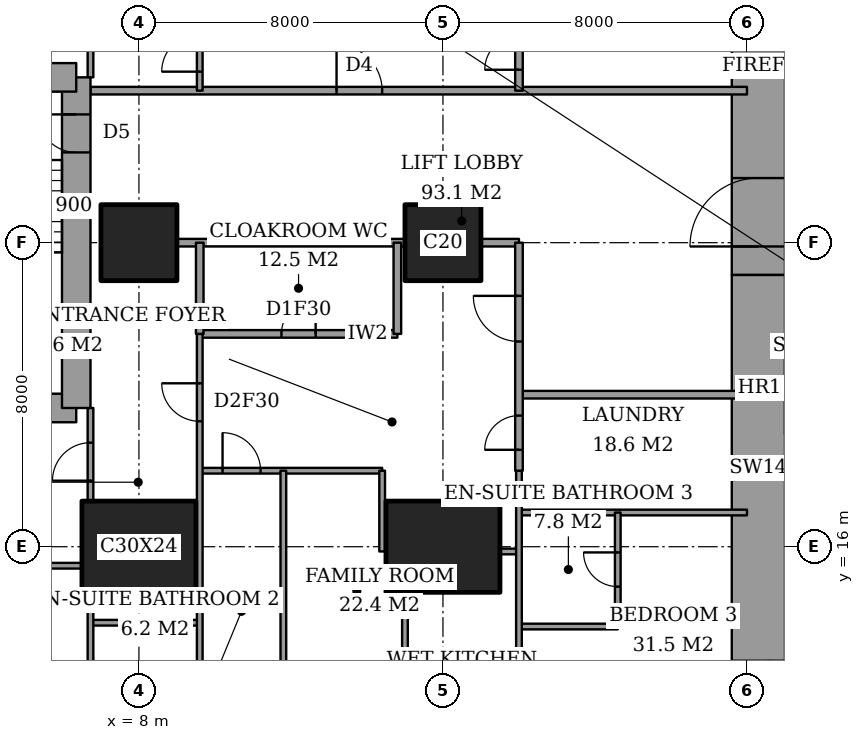
"""IFC4 building model, lengths in metres.
Left out: names, types, materials, properties, quantities, classifications, styles, units other than length and angle.
Written with IfcOpenShell. Run it as: python <this file> out.ifc"""

import sys

from ifc_helpers import new_model, si_unit, direction, frame, frame_2d, origin, origin_2d, place, context, subcontext, project, spatial, rectangle, extrude, element, fill, save


model = new_model("IFC4")
c1 = context("Model", 3, precision=1e-05, world=origin(), true_north=direction((0.0, 1.0)))
c2 = subcontext(c1, "Body", "Model", "MODEL_VIEW")
j1 = project(units=[si_unit("LENGTHUNIT", "METRE"), si_unit("PLANEANGLEUNIT", "RADIAN")], contexts=[c1])
p1 = place(None, origin())
s1 = spatial("IfcSite", under=j1, at=p1, CompositionType="ELEMENT")
p2 = place(p1, origin())
s2 = spatial("IfcBuilding", under=s1, at=p2, CompositionType="ELEMENT")
p3 = place(p2, frame((0.0, 0.0, 62.0)))
s3 = spatial("IfcBuildingStorey", under=s2, at=p3, CompositionType="ELEMENT", Elevation=62.0)
p4 = place(p3, frame((8.0, 16.0, 0.0), z_axis=(0.0, 0.0, 1.0), x_axis=(1.0, 0.0, 0.0)))
e1 = element("IfcColumn", 1, at=p4, inside=s3, PredefinedType="COLUMN", context=c2, shape_type="SweptSolid", body=[
    extrude(rectangle(XDim=3.0, YDim=2.4, at=origin_2d()), origin(), (0.0, 0.0, 1.0), 3.6),
])
p5 = place(p3, frame((8.0, 24.0, 0.0), z_axis=(0.0, 0.0, 1.0), x_axis=(1.0, 0.0, 0.0)))
e2 = element("IfcColumn", 2, at=p5, inside=s3, PredefinedType="COLUMN", context=c2, shape_type="SweptSolid", body=[
    extrude(rectangle(XDim=2.0, YDim=2.0, at=origin_2d()), origin(), (0.0, 0.0, 1.0), 3.6),
])
p6 = place(p3, frame((16.0, 16.0, 0.0), z_axis=(0.0, 0.0, 1.0), x_axis=(1.0, 0.0, 0.0)))
e3 = element("IfcColumn", 3, at=p6, inside=s3, PredefinedType="COLUMN", context=c2, shape_type="SweptSolid", body=[
    extrude(rectangle(XDim=3.0, YDim=2.4, at=origin_2d()), origin(), (0.0, 0.0, 1.0), 3.6),
])
p7 = place(p3, frame((16.0, 24.0, 0.0), z_axis=(0.0, 0.0, 1.0), x_axis=(1.0, 0.0, 0.0)))
e4 = element("IfcColumn", 4, at=p7, inside=s3, PredefinedType="COLUMN", context=c2, shape_type="SweptSolid", body=[
    extrude(rectangle(XDim=2.0, YDim=2.0, at=origin_2d()), origin(), (0.0, 0.0, 1.0), 3.6),
])
p8 = place(p3, frame((24.3, 13.0, 0.0), z_axis=(0.0, 0.0, 1.0), x_axis=(0.0, 1.0, 0.0)))
e5 = element("IfcWall", 5, at=p8, inside=s3, PredefinedType="SHEAR", context=c2, shape_type="SweptSolid", body=[
    extrude(rectangle(XDim=10.15, YDim=1.4, at=frame_2d((5.075, 0.0))), origin(), (0.0, 0.0, 1.0), 3.6),
])
p9 = place(p3, frame((24.3, 23.15, 0.0), z_axis=(0.0, 0.0, 1.0), x_axis=(0.0, 1.0, 0.0)))
e6 = element("IfcWall", 6, at=p9, inside=s3, PredefinedType="SHEAR", context=c2, shape_type="SweptSolid", body=[
    extrude(rectangle(XDim=11.85, YDim=1.4, at=frame_2d((5.925, 0.0))), origin(), (0.0, 0.0, 1.0), 3.6),
])
p10 = place(p9, frame((0.75, 0.0, 0.0)))
e7 = element("IfcOpeningElement", 7, at=p10, cuts=e6, PredefinedType="OPENING", context=c2, shape_type="SweptSolid", body=[
    extrude(rectangle(XDim=1.8, YDim=2.4, at=frame_2d((0.9, 1.2))), frame((0.0, 0.71, 0.0), z_axis=(0.0, -1.0, 0.0), x_axis=(1.0, 0.0, 0.0)), (0.0, 0.0, 1.0), 1.42),
])
p11 = place(p3, frame((1.9, 19.65, 0.0), z_axis=(0.0, 0.0, 1.0), x_axis=(1.0, 0.0, 0.0)))
e8 = element("IfcWall", 8, at=p11, inside=s3, PredefinedType="SHEAR", context=c2, shape_type="SweptSolid", body=[
    extrude(rectangle(XDim=4.45, YDim=0.75, at=frame_2d((2.225, 0.0))), origin(), (0.0, 0.0, 1.0), 3.6),
])
p12 = place(p3, frame((6.35, 19.65, 0.0), z_axis=(0.0, 0.0, 1.0), x_axis=(0.0, 1.0, 0.0)))
e9 = element("IfcWall", 9, at=p12, inside=s3, PredefinedType="SHEAR", context=c2, shape_type="SweptSolid", body=[
    extrude(rectangle(XDim=8.7, YDim=0.75, at=frame_2d((4.35, 0.0))), origin(), (0.0, 0.0, 1.0), 3.6),
])
p13 = place(p12, frame((6.725, 0.0, 0.0)))
e10 = element("IfcOpeningElement", 10, at=p13, cuts=e9, PredefinedType="OPENING", context=c2, shape_type="SweptSolid", body=[
    extrude(rectangle(XDim=1.0, YDim=2.1, at=frame_2d((0.5, 1.05))), frame((0.0, 0.385, 0.0), z_axis=(0.0, -1.0, 0.0), x_axis=(1.0, 0.0, 0.0)), (0.0, 0.0, 1.0), 0.77),
])
p14 = place(p3, frame((6.35, 28.35, 0.0), z_axis=(0.0, 0.0, 1.0), x_axis=(-1.0, 0.0, 0.0)))
e11 = element("IfcWall", 11, at=p14, inside=s3, PredefinedType="SHEAR", context=c2, shape_type="SweptSolid", body=[
    extrude(rectangle(XDim=4.45, YDim=0.75, at=frame_2d((2.225, 0.0))), origin(), (0.0, 0.0, 1.0), 3.6),
])
p15 = place(p3, frame((18.0, 13.9, 0.0), z_axis=(0.0, 0.0, 1.0), x_axis=(1.0, 0.0, 0.0)))
e12 = element("IfcWall", 12, at=p15, inside=s3, PredefinedType="PARTITIONING", context=c2, shape_type="SweptSolid", body=[
    extrude(rectangle(XDim=2.6, YDim=0.15, at=frame_2d((1.3, 0.0))), origin(), (0.0, 0.0, 1.0), 3.35),
])
p16 = place(p3, frame((6.725, 14.0, 0.0), z_axis=(0.0, 0.0, 1.0), x_axis=(1.0, 0.0, 0.0)))
e13 = element("IfcWall", 13, at=p16, inside=s3, PredefinedType="PARTITIONING", context=c2, shape_type="SweptSolid", body=[
    extrude(rectangle(XDim=2.875, YDim=0.15, at=frame_2d((1.438, 0.0))), origin(), (0.0, 0.0, 1.0), 3.35),
])
p17 = place(p3, frame((1.35, 15.5, 0.0), z_axis=(0.0, 0.0, 1.0), x_axis=(1.0, 0.0, 0.0)))
e14 = element("IfcWall", 14, at=p17, inside=s3, PredefinedType="PARTITIONING", context=c2, shape_type="SweptSolid", body=[
    extrude(rectangle(XDim=5.15, YDim=0.15, at=frame_2d((2.575, 0.0))), origin(), (0.0, 0.0, 1.0), 3.35),
])
p18 = place(p3, frame((17.5, 15.875, 0.0), z_axis=(0.0, 0.0, 1.0), x_axis=(1.0, 0.0, 0.0)))
e15 = element("IfcWall", 15, at=p18, inside=s3, PredefinedType="PARTITIONING", context=c2, shape_type="SweptSolid", body=[
    extrude(rectangle(XDim=0.5, YDim=0.15, at=frame_2d((0.25, 0.0))), origin(), (0.0, 0.0, 1.0), 2.634),
])
p19 = place(p3, frame((18.0, 16.9, 0.0), z_axis=(0.0, 0.0, 1.0), x_axis=(1.0, 0.0, 0.0)))
e16 = element("IfcWall", 16, at=p19, inside=s3, PredefinedType="PARTITIONING", context=c2, shape_type="SweptSolid", body=[
    extrude(rectangle(XDim=6.0, YDim=0.15, at=frame_2d((3.0, 0.0))), origin(), (0.0, 0.0, 1.0), 3.35),
])
p20 = place(p3, frame((9.6, 18.0, 0.0), z_axis=(0.0, 0.0, 1.0), x_axis=(1.0, 0.0, 0.0)))
e17 = element("IfcWall", 17, at=p20, inside=s3, PredefinedType="PARTITIONING", context=c2, shape_type="SweptSolid", body=[
    extrude(rectangle(XDim=4.8, YDim=0.15, at=frame_2d((2.4, 0.0))), origin(), (0.0, 0.0, 1.0), 3.35),
])
p21 = place(p20, frame((0.6, 0.0, 0.0)))
e18 = element("IfcOpeningElement", 18, at=p21, cuts=e17, PredefinedType="OPENING", context=c2, shape_type="SweptSolid", body=[
    extrude(rectangle(XDim=1.0, YDim=2.1, at=frame_2d((0.5, 1.05))), frame((0.0, 0.085, 0.0), z_axis=(0.0, -1.0, 0.0), x_axis=(1.0, 0.0, 0.0)), (0.0, 0.0, 1.0), 0.17),
])
p22 = place(p3, frame((18.0, 20.0, 0.0), z_axis=(0.0, 0.0, 1.0), x_axis=(1.0, 0.0, 0.0)))
e19 = element("IfcWall", 19, at=p22, inside=s3, PredefinedType="PARTITIONING", context=c2, shape_type="SweptSolid", body=[
    extrude(rectangle(XDim=6.0, YDim=0.2, at=frame_2d((3.0, 0.0))), origin(), (0.0, 0.0, 1.0), 3.35),
])
p23 = place(p3, frame((9.6, 21.6, 0.0), z_axis=(0.0, 0.0, 1.0), x_axis=(1.0, 0.0, 0.0)))
e20 = element("IfcWall", 20, at=p23, inside=s3, PredefinedType="PARTITIONING", context=c2, shape_type="SweptSolid", body=[
    extrude(rectangle(XDim=5.2, YDim=0.2, at=frame_2d((2.6, 0.0))), origin(), (0.0, 0.0, 1.0), 3.35),
])
p24 = place(p23, frame((2.15, 0.0, 0.0)))
e21 = element("IfcOpeningElement", 21, at=p24, cuts=e20, PredefinedType="OPENING", context=c2, shape_type="SweptSolid", body=[
    extrude(rectangle(XDim=0.9, YDim=2.1, at=frame_2d((0.45, 1.05))), frame((0.0, 0.11, 0.0), z_axis=(0.0, -1.0, 0.0), x_axis=(1.0, 0.0, 0.0)), (0.0, 0.0, 1.0), 0.22),
])
p25 = place(p3, frame((9.0, 24.0, 0.0), z_axis=(0.0, 0.0, 1.0), x_axis=(1.0, 0.0, 0.0)))
e22 = element("IfcWall", 22, at=p25, inside=s3, PredefinedType="PARTITIONING", context=c2, shape_type="SweptSolid", body=[
    extrude(rectangle(XDim=6.0, YDim=0.2, at=frame_2d((3.0, 0.0))), origin(), (0.0, 0.0, 1.0), 3.35),
])
p26 = place(p3, frame((17.0, 24.0, 0.0), z_axis=(0.0, 0.0, 1.0), x_axis=(1.0, 0.0, 0.0)))
e23 = element("IfcWall", 23, at=p26, inside=s3, PredefinedType="PARTITIONING", context=c2, shape_type="SweptSolid", body=[
    extrude(rectangle(XDim=1.0, YDim=0.2, at=frame_2d((0.5, 0.0))), origin(), (0.0, 0.0, 1.0), 3.35),
])
p27 = place(p3, frame((6.725, 28.0, 0.0), z_axis=(0.0, 0.0, 1.0), x_axis=(1.0, 0.0, 0.0)))
e24 = element("IfcWall", 24, at=p27, inside=s3, PredefinedType="PARTITIONING", context=c2, shape_type="SweptSolid", body=[
    extrude(rectangle(XDim=17.275, YDim=0.2, at=frame_2d((8.637, 0.0))), origin(), (0.0, 0.0, 1.0), 3.35),
])
p28 = place(p27, frame((6.475, 0.0, 0.0)))
e25 = element("IfcOpeningElement", 25, at=p28, cuts=e24, PredefinedType="OPENING", context=c2, shape_type="SweptSolid", body=[
    extrude(rectangle(XDim=1.2, YDim=2.4, at=frame_2d((0.6, 1.2))), frame((0.0, 0.11, 0.0), z_axis=(0.0, -1.0, 0.0), x_axis=(1.0, 0.0, 0.0)), (0.0, 0.0, 1.0), 0.22),
])
p29 = place(p3, frame((6.725, 10.6, 0.0), z_axis=(0.0, 0.0, 1.0), x_axis=(0.0, 1.0, 0.0)))
e26 = element("IfcWall", 26, at=p29, inside=s3, PredefinedType="PARTITIONING", context=c2, shape_type="SweptSolid", body=[
    extrude(rectangle(XDim=4.2, YDim=0.15, at=frame_2d((2.1, 0.0))), origin(), (0.0, 0.0, 1.0), 3.35),
])
p30 = place(p3, frame((6.725, 17.2, 0.0), z_axis=(0.0, 0.0, 1.0), x_axis=(0.0, 1.0, 0.0)))
e27 = element("IfcWall", 27, at=p30, inside=s3, PredefinedType="PARTITIONING", context=c2, shape_type="SweptSolid", body=[
    extrude(rectangle(XDim=2.45, YDim=0.15, at=frame_2d((1.225, 0.0))), origin(), (0.0, 0.0, 1.0), 3.35),
])
p31 = place(p30, frame((0.538, 0.0, 0.0)))
e28 = element("IfcOpeningElement", 28, at=p31, cuts=e27, PredefinedType="OPENING", context=c2, shape_type="SweptSolid", body=[
    extrude(rectangle(XDim=1.0, YDim=2.1, at=frame_2d((0.5, 1.05))), frame((0.0, 0.085, 0.0), z_axis=(0.0, -1.0, 0.0), x_axis=(1.0, 0.0, 0.0)), (0.0, 0.0, 1.0), 0.17),
])
p32 = place(p3, frame((6.725, 28.35, 0.0), z_axis=(0.0, 0.0, 1.0), x_axis=(0.0, 1.0, 0.0)))
e29 = element("IfcWall", 29, at=p32, inside=s3, PredefinedType="PARTITIONING", context=c2, shape_type="SweptSolid", body=[
    extrude(rectangle(XDim=2.45, YDim=0.15, at=frame_2d((1.225, 0.0))), origin(), (0.0, 0.0, 1.0), 3.35),
])
p33 = place(p32, frame((0.913, 0.0, 0.0)))
e30 = element("IfcOpeningElement", 30, at=p33, cuts=e29, PredefinedType="OPENING", context=c2, shape_type="SweptSolid", body=[
    extrude(rectangle(XDim=1.0, YDim=2.1, at=frame_2d((0.5, 1.05))), frame((0.0, 0.085, 0.0), z_axis=(0.0, -1.0, 0.0), x_axis=(1.0, 0.0, 0.0)), (0.0, 0.0, 1.0), 0.17),
])
p34 = place(p3, frame((9.6, 21.6, 0.0), z_axis=(0.0, 0.0, 1.0), x_axis=(0.0, 1.0, 0.0)))
e31 = element("IfcWall", 31, at=p34, inside=s3, PredefinedType="PARTITIONING", context=c2, shape_type="SweptSolid", body=[
    extrude(rectangle(XDim=2.4, YDim=0.2, at=frame_2d((1.2, 0.0))), origin(), (0.0, 0.0, 1.0), 3.35),
])
p35 = place(p3, frame((9.6, 10.6, 0.0), z_axis=(0.0, 0.0, 1.0), x_axis=(0.0, 1.0, 0.0)))
e32 = element("IfcWall", 32, at=p35, inside=s3, PredefinedType="PARTITIONING", context=c2, shape_type="SweptSolid", body=[
    extrude(rectangle(XDim=11.0, YDim=0.15, at=frame_2d((5.5, 0.0))), origin(), (0.0, 0.0, 1.0), 3.35),
])
p36 = place(p35, frame((8.7, 0.0, 0.0)))
e33 = element("IfcOpeningElement", 33, at=p36, cuts=e32, PredefinedType="OPENING", context=c2, shape_type="SweptSolid", body=[
    extrude(rectangle(XDim=1.0, YDim=2.1, at=frame_2d((0.5, 1.05))), frame((0.0, 0.085, 0.0), z_axis=(0.0, -1.0, 0.0), x_axis=(1.0, 0.0, 0.0)), (0.0, 0.0, 1.0), 0.17),
])
p37 = place(p3, frame((9.6, 28.0, 0.0), z_axis=(0.0, 0.0, 1.0), x_axis=(0.0, 1.0, 0.0)))
e34 = element("IfcWall", 34, at=p37, inside=s3, PredefinedType="PARTITIONING", context=c2, shape_type="SweptSolid", body=[
    extrude(rectangle(XDim=9.4, YDim=0.15, at=frame_2d((4.7, 0.0))), origin(), (0.0, 0.0, 1.0), 3.35),
])
p38 = place(p37, frame((0.5, 0.0, 0.0)))
e35 = element("IfcOpeningElement", 35, at=p38, cuts=e34, PredefinedType="OPENING", context=c2, shape_type="SweptSolid", body=[
    extrude(rectangle(XDim=1.0, YDim=2.1, at=frame_2d((0.5, 1.05))), frame((0.0, 0.085, 0.0), z_axis=(0.0, -1.0, 0.0), x_axis=(1.0, 0.0, 0.0)), (0.0, 0.0, 1.0), 0.17),
])
p39 = place(p3, frame((11.8, 10.6, 0.0), z_axis=(0.0, 0.0, 1.0), x_axis=(0.0, 1.0, 0.0)))
e36 = element("IfcWall", 36, at=p39, inside=s3, PredefinedType="PARTITIONING", context=c2, shape_type="SweptSolid", body=[
    extrude(rectangle(XDim=7.4, YDim=0.15, at=frame_2d((3.7, 0.0))), origin(), (0.0, 0.0, 1.0), 3.35),
])
p40 = place(p3, frame((14.4, 15.875, 0.0), z_axis=(0.0, 0.0, 1.0), x_axis=(0.0, 1.0, 0.0)))
e37 = element("IfcWall", 37, at=p40, inside=s3, PredefinedType="PARTITIONING", context=c2, shape_type="SweptSolid", body=[
    extrude(rectangle(XDim=2.125, YDim=0.15, at=frame_2d((1.062, 0.0))), origin(), (0.0, 0.0, 1.0), 3.35),
])
p41 = place(p3, frame((14.8, 21.6, 0.0), z_axis=(0.0, 0.0, 1.0), x_axis=(0.0, 1.0, 0.0)))
e38 = element("IfcWall", 38, at=p41, inside=s3, PredefinedType="PARTITIONING", context=c2, shape_type="SweptSolid", body=[
    extrude(rectangle(XDim=2.4, YDim=0.2, at=frame_2d((1.2, 0.0))), origin(), (0.0, 0.0, 1.0), 3.35),
])
p42 = place(p3, frame((15.0, 10.6, 0.0), z_axis=(0.0, 0.0, 1.0), x_axis=(0.0, 1.0, 0.0)))
e39 = element("IfcWall", 39, at=p42, inside=s3, PredefinedType="PARTITIONING", context=c2, shape_type="SweptSolid", body=[
    extrude(rectangle(XDim=4.2, YDim=0.15, at=frame_2d((2.1, 0.0))), origin(), (0.0, 0.0, 1.0), 3.35),
])
p43 = place(p3, frame((18.0, 18.0, 0.0), z_axis=(0.0, 0.0, 1.0), x_axis=(0.0, 1.0, 0.0)))
e40 = element("IfcWall", 40, at=p43, inside=s3, PredefinedType="PARTITIONING", context=c2, shape_type="SweptSolid", body=[
    extrude(rectangle(XDim=6.0, YDim=0.2, at=frame_2d((3.0, 0.0))), origin(), (0.0, 0.0, 1.0), 3.35),
])
p44 = place(p43, frame((3.4, 0.0, 0.0)))
e41 = element("IfcOpeningElement", 41, at=p44, cuts=e40, PredefinedType="OPENING", context=c2, shape_type="SweptSolid", body=[
    extrude(rectangle(XDim=1.2, YDim=2.4, at=frame_2d((0.6, 1.2))), frame((0.0, 0.11, 0.0), z_axis=(0.0, -1.0, 0.0), x_axis=(1.0, 0.0, 0.0)), (0.0, 0.0, 1.0), 0.22),
])
p45 = place(p43, frame((0.55, 0.0, 0.0)))
e42 = element("IfcOpeningElement", 42, at=p45, cuts=e40, PredefinedType="OPENING", context=c2, shape_type="SweptSolid", body=[
    extrude(rectangle(XDim=0.9, YDim=2.1, at=frame_2d((0.45, 1.05))), frame((0.0, 0.11, 0.0), z_axis=(0.0, -1.0, 0.0), x_axis=(1.0, 0.0, 0.0)), (0.0, 0.0, 1.0), 0.22),
])
p46 = place(p3, frame((18.0, 28.0, 0.0), z_axis=(0.0, 0.0, 1.0), x_axis=(0.0, 1.0, 0.0)))
e43 = element("IfcWall", 43, at=p46, inside=s3, PredefinedType="PARTITIONING", context=c2, shape_type="SweptSolid", body=[
    extrude(rectangle(XDim=3.4, YDim=0.2, at=frame_2d((1.7, 0.0))), origin(), (0.0, 0.0, 1.0), 3.35),
])
p47 = place(p46, frame((0.55, 0.0, 0.0)))
e44 = element("IfcOpeningElement", 44, at=p47, cuts=e43, PredefinedType="OPENING", context=c2, shape_type="SweptSolid", body=[
    extrude(rectangle(XDim=0.9, YDim=2.1, at=frame_2d((0.45, 1.05))), frame((0.0, 0.11, 0.0), z_axis=(0.0, -1.0, 0.0), x_axis=(1.0, 0.0, 0.0)), (0.0, 0.0, 1.0), 0.22),
])
p48 = place(p3, frame((18.0, 10.6, 0.0), z_axis=(0.0, 0.0, 1.0), x_axis=(0.0, 1.0, 0.0)))
e45 = element("IfcWall", 45, at=p48, inside=s3, PredefinedType="PARTITIONING", context=c2, shape_type="SweptSolid", body=[
    extrude(rectangle(XDim=7.4, YDim=0.15, at=frame_2d((3.7, 0.0))), origin(), (0.0, 0.0, 1.0), 3.35),
])
p49 = place(p3, frame((20.6, 13.9, 0.0), z_axis=(0.0, 0.0, 1.0), x_axis=(0.0, 1.0, 0.0)))
e46 = element("IfcWall", 46, at=p49, inside=s3, PredefinedType="PARTITIONING", context=c2, shape_type="SweptSolid", body=[
    extrude(rectangle(XDim=3.0, YDim=0.15, at=frame_2d((1.5, 0.0))), origin(), (0.0, 0.0, 1.0), 3.35),
])
p50 = place(p49, frame((1.05, 0.0, 0.0)))
e47 = element("IfcOpeningElement", 47, at=p50, cuts=e46, PredefinedType="OPENING", context=c2, shape_type="SweptSolid", body=[
    extrude(rectangle(XDim=0.9, YDim=2.1, at=frame_2d((0.45, 1.05))), frame((0.0, 0.085, 0.0), z_axis=(0.0, -1.0, 0.0), x_axis=(1.0, 0.0, 0.0)), (0.0, 0.0, 1.0), 0.17),
])
p51 = place(p31, origin())
e48 = element("IfcDoor", 48, at=p51, inside=s3, OperationType="SINGLE_SWING_RIGHT", PredefinedType="DOOR", context=c2, shape_type="SweptSolid", body=[
    extrude(rectangle(XDim=1.0, YDim=2.1, at=frame_2d((0.5, 1.05))), frame((0.0, 0.025, 0.0), z_axis=(0.0, -1.0, 0.0), x_axis=(1.0, 0.0, 0.0)), (0.0, 0.0, 1.0), 0.05),
])
fill(e28, e48)
p52 = place(p36, origin())
e49 = element("IfcDoor", 49, at=p52, inside=s3, OperationType="SINGLE_SWING_LEFT", PredefinedType="DOOR", context=c2, shape_type="SweptSolid", body=[
    extrude(rectangle(XDim=1.0, YDim=2.1, at=frame_2d((0.5, 1.05))), frame((0.0, 0.025, 0.0), z_axis=(0.0, -1.0, 0.0), x_axis=(1.0, 0.0, 0.0)), (0.0, 0.0, 1.0), 0.05),
])
fill(e33, e49)
p53 = place(p24, origin())
e50 = element("IfcDoor", 50, at=p53, inside=s3, OperationType="SINGLE_SWING_LEFT", PredefinedType="DOOR", context=c2, shape_type="SweptSolid", body=[
    extrude(rectangle(XDim=0.9, YDim=2.1, at=frame_2d((0.45, 1.05))), frame((0.0, 0.025, 0.0), z_axis=(0.0, -1.0, 0.0), x_axis=(1.0, 0.0, 0.0)), (0.0, 0.0, 1.0), 0.05),
])
fill(e21, e50)
p54 = place(p44, origin())
e51 = element("IfcDoor", 51, at=p54, inside=s3, OperationType="SINGLE_SWING_LEFT", PredefinedType="DOOR", context=c2, shape_type="SweptSolid", body=[
    extrude(rectangle(XDim=1.2, YDim=2.4, at=frame_2d((0.6, 1.2))), frame((0.0, 0.025, 0.0), z_axis=(0.0, -1.0, 0.0), x_axis=(1.0, 0.0, 0.0)), (0.0, 0.0, 1.0), 0.05),
])
fill(e41, e51)
p55 = place(p21, origin())
e52 = element("IfcDoor", 52, at=p55, inside=s3, OperationType="SINGLE_SWING_RIGHT", PredefinedType="DOOR", context=c2, shape_type="SweptSolid", body=[
    extrude(rectangle(XDim=1.0, YDim=2.1, at=frame_2d((0.5, 1.05))), frame((0.0, 0.025, 0.0), z_axis=(0.0, -1.0, 0.0), x_axis=(1.0, 0.0, 0.0)), (0.0, 0.0, 1.0), 0.05),
])
fill(e18, e52)
p56 = place(p50, origin())
e53 = element("IfcDoor", 53, at=p56, inside=s3, OperationType="SINGLE_SWING_LEFT", PredefinedType="DOOR", context=c2, shape_type="SweptSolid", body=[
    extrude(rectangle(XDim=0.9, YDim=2.1, at=frame_2d((0.45, 1.05))), frame((0.0, 0.025, 0.0), z_axis=(0.0, -1.0, 0.0), x_axis=(1.0, 0.0, 0.0)), (0.0, 0.0, 1.0), 0.05),
])
fill(e47, e53)
p57 = place(p45, origin())
e54 = element("IfcDoor", 54, at=p57, inside=s3, OperationType="SINGLE_SWING_RIGHT", PredefinedType="DOOR", context=c2, shape_type="SweptSolid", body=[
    extrude(rectangle(XDim=0.9, YDim=2.1, at=frame_2d((0.45, 1.05))), frame((0.0, 0.025, 0.0), z_axis=(0.0, -1.0, 0.0), x_axis=(1.0, 0.0, 0.0)), (0.0, 0.0, 1.0), 0.05),
])
fill(e42, e54)
p58 = place(p38, origin())
e55 = element("IfcDoor", 55, at=p58, inside=s3, OperationType="SINGLE_SWING_RIGHT", PredefinedType="DOOR", context=c2, shape_type="SweptSolid", body=[
    extrude(rectangle(XDim=1.0, YDim=2.1, at=frame_2d((0.5, 1.05))), frame((0.0, 0.025, 0.0), z_axis=(0.0, -1.0, 0.0), x_axis=(1.0, 0.0, 0.0)), (0.0, 0.0, 1.0), 0.05),
])
fill(e35, e55)
p59 = place(p28, origin())
e56 = element("IfcDoor", 56, at=p59, inside=s3, OperationType="SINGLE_SWING_RIGHT", PredefinedType="DOOR", context=c2, shape_type="SweptSolid", body=[
    extrude(rectangle(XDim=1.2, YDim=2.4, at=frame_2d((0.6, 1.2))), frame((0.0, 0.025, 0.0), z_axis=(0.0, -1.0, 0.0), x_axis=(1.0, 0.0, 0.0)), (0.0, 0.0, 1.0), 0.05),
])
fill(e25, e56)
p60 = place(p47, origin())
e57 = element("IfcDoor", 57, at=p60, inside=s3, OperationType="SINGLE_SWING_RIGHT", PredefinedType="DOOR", context=c2, shape_type="SweptSolid", body=[
    extrude(rectangle(XDim=0.9, YDim=2.1, at=frame_2d((0.45, 1.05))), frame((0.0, 0.025, 0.0), z_axis=(0.0, -1.0, 0.0), x_axis=(1.0, 0.0, 0.0)), (0.0, 0.0, 1.0), 0.05),
])
fill(e44, e57)
p61 = place(p10, origin())
e58 = element("IfcDoor", 58, at=p61, inside=s3, OperationType="DOUBLE_DOOR_DOUBLE_SWING", PredefinedType="DOOR", context=c2, shape_type="SweptSolid", body=[
    extrude(rectangle(XDim=1.8, YDim=2.4, at=frame_2d((0.9, 1.2))), frame((0.0, 0.025, 0.0), z_axis=(0.0, -1.0, 0.0), x_axis=(1.0, 0.0, 0.0)), (0.0, 0.0, 1.0), 0.05),
])
fill(e7, e58)
p62 = place(p13, origin())
e59 = element("IfcDoor", 59, at=p62, inside=s3, OperationType="SINGLE_SWING_LEFT", PredefinedType="DOOR", context=c2, shape_type="SweptSolid", body=[
    extrude(rectangle(XDim=1.0, YDim=2.1, at=frame_2d((0.5, 1.05))), frame((0.0, 0.025, 0.0), z_axis=(0.0, -1.0, 0.0), x_axis=(1.0, 0.0, 0.0)), (0.0, 0.0, 1.0), 0.05),
])
fill(e10, e59)
save(model, sys.argv[1])
